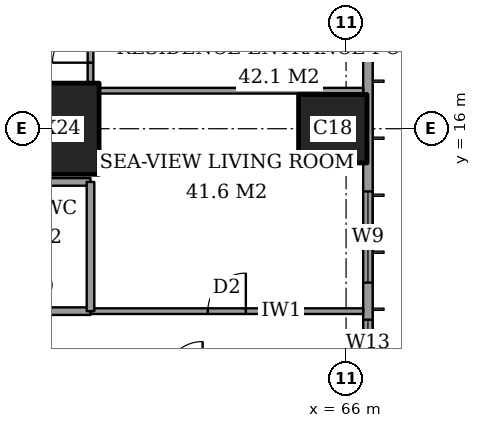
"""IFC4 building model, lengths in metres.
Left out: names, types, materials, properties, quantities, classifications, styles, units other than length and angle.
Written with IfcOpenShell. Run it as: python <this file> out.ifc"""

import sys

from ifc_helpers import new_model, si_unit, direction, frame, frame_2d, origin, origin_2d, place, context, subcontext, project, spatial, rectangle, extrude, element, fill, save


model = new_model("IFC4")
c1 = context("Model", 3, precision=1e-05, world=origin(), true_north=direction((0.0, 1.0)))
c2 = subcontext(c1, "Body", "Model", "MODEL_VIEW")
j1 = project(units=[si_unit("LENGTHUNIT", "METRE"), si_unit("PLANEANGLEUNIT", "RADIAN")], contexts=[c1])
p1 = place(None, origin())
s1 = spatial("IfcSite", under=j1, at=p1, CompositionType="ELEMENT")
p2 = place(p1, origin())
s2 = spatial("IfcBuilding", under=s1, at=p2, CompositionType="ELEMENT")
p3 = place(p2, frame((0.0, 0.0, 207.4)))
s3 = spatial("IfcBuildingStorey", under=s2, at=p3, CompositionType="ELEMENT", Elevation=207.4)
p4 = place(p3, frame((58.0, 16.0, 0.0), z_axis=(0.0, 0.0, 1.0), x_axis=(1.0, 0.0, 0.0)))
e1 = element("IfcColumn", 1, at=p4, inside=s3, PredefinedType="COLUMN", context=c2, shape_type="SweptSolid", body=[
    extrude(rectangle(XDim=3.0, YDim=2.4, at=origin_2d()), origin(), (0.0, 0.0, 1.0), 3.6),
])
p5 = place(p3, frame((65.65, 16.0, 0.0), z_axis=(0.0, 0.0, 1.0), x_axis=(1.0, 0.0, 0.0)))
e2 = element("IfcColumn", 2, at=p5, inside=s3, PredefinedType="COLUMN", context=c2, shape_type="SweptSolid", body=[
    extrude(rectangle(XDim=1.8, YDim=1.8, at=origin_2d()), origin(), (0.0, 0.0, 1.0), 3.6),
])
p6 = place(p3, frame((66.575, 3.175, 0.0), z_axis=(0.0, 0.0, 1.0), x_axis=(0.0, 1.0, 0.0)))
e3 = element("IfcWall", 3, at=p6, inside=s3, PredefinedType="SOLIDWALL", context=c2, shape_type="SweptSolid", body=[
    extrude(rectangle(XDim=41.65, YDim=0.25, at=frame_2d((20.825, 0.0))), origin(), (0.0, 0.0, 1.0), 3.6),
])
p7 = place(p6, frame((0.825, 0.0, 0.2)))
e4 = element("IfcOpeningElement", 4, at=p7, cuts=e3, PredefinedType="OPENING", context=c2, shape_type="SweptSolid", body=[
    extrude(rectangle(XDim=2.4, YDim=2.4, at=frame_2d((1.2, 1.2))), frame((0.0, 0.135, 0.0), z_axis=(0.0, -1.0, 0.0), x_axis=(1.0, 0.0, 0.0)), (0.0, 0.0, 1.0), 0.27),
])
p8 = place(p6, frame((6.6, 0.0, 0.2)))
e5 = element("IfcOpeningElement", 5, at=p8, cuts=e3, PredefinedType="OPENING", context=c2, shape_type="SweptSolid", body=[
    extrude(rectangle(XDim=1.2, YDim=2.4, at=frame_2d((0.6, 1.2))), frame((0.0, 0.135, 0.0), z_axis=(0.0, -1.0, 0.0), x_axis=(1.0, 0.0, 0.0)), (0.0, 0.0, 1.0), 0.27),
])
p9 = place(p6, frame((8.775, 0.0, 0.2)))
e6 = element("IfcOpeningElement", 6, at=p9, cuts=e3, PredefinedType="OPENING", context=c2, shape_type="SweptSolid", body=[
    extrude(rectangle(XDim=2.4, YDim=2.4, at=frame_2d((1.2, 1.2))), frame((0.0, 0.135, 0.0), z_axis=(0.0, -1.0, 0.0), x_axis=(1.0, 0.0, 0.0)), (0.0, 0.0, 1.0), 0.27),
])
p10 = place(p6, frame((15.675, 0.0, 0.2)))
e7 = element("IfcOpeningElement", 7, at=p10, cuts=e3, PredefinedType="OPENING", context=c2, shape_type="SweptSolid", body=[
    extrude(rectangle(XDim=2.4, YDim=2.4, at=frame_2d((1.2, 1.2))), frame((0.0, 0.135, 0.0), z_axis=(0.0, -1.0, 0.0), x_axis=(1.0, 0.0, 0.0)), (0.0, 0.0, 1.0), 0.27),
])
p11 = place(p6, frame((23.575, 0.0, 0.2)))
e8 = element("IfcOpeningElement", 8, at=p11, cuts=e3, PredefinedType="OPENING", context=c2, shape_type="SweptSolid", body=[
    extrude(rectangle(XDim=2.4, YDim=2.4, at=frame_2d((1.2, 1.2))), frame((0.0, 0.135, 0.0), z_axis=(0.0, -1.0, 0.0), x_axis=(1.0, 0.0, 0.0)), (0.0, 0.0, 1.0), 0.27),
])
p12 = place(p6, frame((30.675, 0.0, 0.2)))
e9 = element("IfcOpeningElement", 9, at=p12, cuts=e3, PredefinedType="OPENING", context=c2, shape_type="SweptSolid", body=[
    extrude(rectangle(XDim=2.4, YDim=2.4, at=frame_2d((1.2, 1.2))), frame((0.0, 0.135, 0.0), z_axis=(0.0, -1.0, 0.0), x_axis=(1.0, 0.0, 0.0)), (0.0, 0.0, 1.0), 0.27),
])
p13 = place(p6, frame((34.325, 0.0, 0.2)))
e10 = element("IfcOpeningElement", 10, at=p13, cuts=e3, PredefinedType="OPENING", context=c2, shape_type="SweptSolid", body=[
    extrude(rectangle(XDim=1.2, YDim=2.4, at=frame_2d((0.6, 1.2))), frame((0.0, 0.135, 0.0), z_axis=(0.0, -1.0, 0.0), x_axis=(1.0, 0.0, 0.0)), (0.0, 0.0, 1.0), 0.27),
])
p14 = place(p6, frame((38.425, 0.0, 0.2)))
e11 = element("IfcOpeningElement", 11, at=p14, cuts=e3, PredefinedType="OPENING", context=c2, shape_type="SweptSolid", body=[
    extrude(rectangle(XDim=2.4, YDim=2.4, at=frame_2d((1.2, 1.2))), frame((0.0, 0.135, 0.0), z_axis=(0.0, -1.0, 0.0), x_axis=(1.0, 0.0, 0.0)), (0.0, 0.0, 1.0), 0.27),
])
p15 = place(p3, frame((55.6, 11.2, 0.0), z_axis=(0.0, 0.0, 1.0), x_axis=(1.0, 0.0, 0.0)))
e12 = element("IfcWall", 12, at=p15, inside=s3, PredefinedType="PARTITIONING", context=c2, shape_type="SweptSolid", body=[
    extrude(rectangle(XDim=3.675, YDim=0.2, at=frame_2d((1.837, 0.0))), origin(), (0.0, 0.0, 1.0), 3.35),
])
p16 = place(p15, frame((1.387, 0.0, 0.0)))
e13 = element("IfcOpeningElement", 13, at=p16, cuts=e12, PredefinedType="OPENING", context=c2, shape_type="SweptSolid", body=[
    extrude(rectangle(XDim=0.9, YDim=2.1, at=frame_2d((0.45, 1.05))), frame((0.0, 0.11, 0.0), z_axis=(0.0, -1.0, 0.0), x_axis=(1.0, 0.0, 0.0)), (0.0, 0.0, 1.0), 0.22),
])
p17 = place(p3, frame((59.275, 11.2, 0.0), z_axis=(0.0, 0.0, 1.0), x_axis=(1.0, 0.0, 0.0)))
e14 = element("IfcWall", 14, at=p17, inside=s3, PredefinedType="PARTITIONING", context=c2, shape_type="SweptSolid", body=[
    extrude(rectangle(XDim=7.175, YDim=0.15, at=frame_2d((3.587, 0.0))), origin(), (0.0, 0.0, 1.0), 3.35),
])
p18 = place(p17, frame((3.087, 0.0, 0.0)))
e15 = element("IfcOpeningElement", 15, at=p18, cuts=e14, PredefinedType="OPENING", context=c2, shape_type="SweptSolid", body=[
    extrude(rectangle(XDim=1.0, YDim=2.1, at=frame_2d((0.5, 1.05))), frame((0.0, 0.085, 0.0), z_axis=(0.0, -1.0, 0.0), x_axis=(1.0, 0.0, 0.0)), (0.0, 0.0, 1.0), 0.17),
])
p19 = place(p3, frame((55.6, 14.6, 0.0), z_axis=(0.0, 0.0, 1.0), x_axis=(1.0, 0.0, 0.0)))
e16 = element("IfcWall", 16, at=p19, inside=s3, PredefinedType="PARTITIONING", context=c2, shape_type="SweptSolid", body=[
    extrude(rectangle(XDim=3.675, YDim=0.2, at=frame_2d((1.837, 0.0))), origin(), (0.0, 0.0, 1.0), 3.35),
])
p20 = place(p3, frame((59.5, 17.0, 0.0), z_axis=(0.0, 0.0, 1.0), x_axis=(1.0, 0.0, 0.0)))
e17 = element("IfcWall", 17, at=p20, inside=s3, PredefinedType="PARTITIONING", context=c2, shape_type="SweptSolid", body=[
    extrude(rectangle(XDim=6.95, YDim=0.15, at=frame_2d((3.475, 0.0))), origin(), (0.0, 0.0, 1.0), 3.35),
])
p21 = place(p3, frame((59.275, 11.2, 0.0), z_axis=(0.0, 0.0, 1.0), x_axis=(0.0, 1.0, 0.0)))
e18 = element("IfcWall", 18, at=p21, inside=s3, PredefinedType="PARTITIONING", context=c2, shape_type="SweptSolid", body=[
    extrude(rectangle(XDim=3.4, YDim=0.2, at=frame_2d((1.7, 0.0))), origin(), (0.0, 0.0, 1.0), 3.35),
])
p22 = place(p3, frame((59.275, 17.2, 0.0), z_axis=(0.0, 0.0, 1.0), x_axis=(0.0, 1.0, 0.0)))
e19 = element("IfcWall", 19, at=p22, inside=s3, PredefinedType="PARTITIONING", context=c2, shape_type="SweptSolid", body=[
    extrude(rectangle(XDim=2.45, YDim=0.15, at=frame_2d((1.225, 0.0))), origin(), (0.0, 0.0, 1.0), 3.35),
])
p23 = place(p22, frame((0.538, 0.0, 0.0)))
e20 = element("IfcOpeningElement", 20, at=p23, cuts=e19, PredefinedType="OPENING", context=c2, shape_type="SweptSolid", body=[
    extrude(rectangle(XDim=1.0, YDim=2.1, at=frame_2d((0.5, 1.05))), frame((0.0, 0.085, 0.0), z_axis=(0.0, -1.0, 0.0), x_axis=(1.0, 0.0, 0.0)), (0.0, 0.0, 1.0), 0.17),
])
p24 = place(p8, origin())
e21 = element("IfcWindow", 21, at=p24, inside=s3, PartitioningType="SINGLE_PANEL", PredefinedType="WINDOW", context=c2, shape_type="SweptSolid", body=[
    extrude(rectangle(XDim=1.2, YDim=2.4, at=frame_2d((0.6, 1.2))), frame((0.0, 0.03, 0.0), z_axis=(0.0, -1.0, 0.0), x_axis=(1.0, 0.0, 0.0)), (0.0, 0.0, 1.0), 0.06),
])
fill(e5, e21)
p25 = place(p9, origin())
e22 = element("IfcWindow", 22, at=p25, inside=s3, PartitioningType="SINGLE_PANEL", PredefinedType="WINDOW", context=c2, shape_type="SweptSolid", body=[
    extrude(rectangle(XDim=2.4, YDim=2.4, at=frame_2d((1.2, 1.2))), frame((0.0, 0.03, 0.0), z_axis=(0.0, -1.0, 0.0), x_axis=(1.0, 0.0, 0.0)), (0.0, 0.0, 1.0), 0.06),
])
fill(e6, e22)
p26 = place(p18, origin())
e23 = element("IfcDoor", 23, at=p26, inside=s3, OperationType="SINGLE_SWING_LEFT", PredefinedType="DOOR", context=c2, shape_type="SweptSolid", body=[
    extrude(rectangle(XDim=1.0, YDim=2.1, at=frame_2d((0.5, 1.05))), frame((0.0, 0.025, 0.0), z_axis=(0.0, -1.0, 0.0), x_axis=(1.0, 0.0, 0.0)), (0.0, 0.0, 1.0), 0.05),
])
fill(e15, e23)
p27 = place(p23, origin())
e24 = element("IfcDoor", 24, at=p27, inside=s3, OperationType="SINGLE_SWING_RIGHT", PredefinedType="DOOR", context=c2, shape_type="SweptSolid", body=[
    extrude(rectangle(XDim=1.0, YDim=2.1, at=frame_2d((0.5, 1.05))), frame((0.0, 0.025, 0.0), z_axis=(0.0, -1.0, 0.0), x_axis=(1.0, 0.0, 0.0)), (0.0, 0.0, 1.0), 0.05),
])
fill(e20, e24)
save(model, sys.argv[1])
